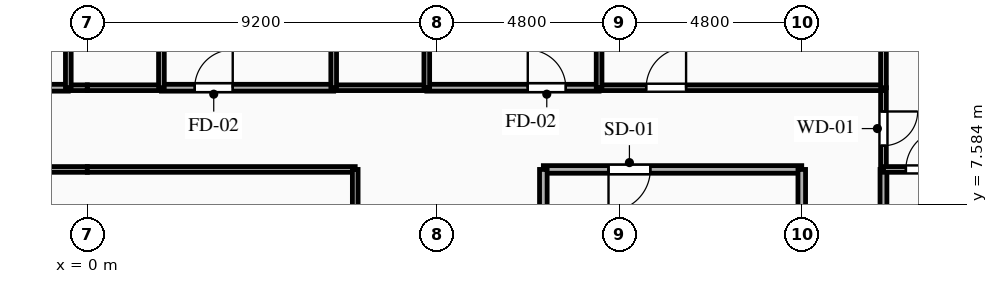
"""IFC4 building model, lengths in metres.
Left out: names, types, materials, properties, quantities, classifications, styles, units other than length and angle.
Written with IfcOpenShell. Run it as: python <this file> out.ifc"""

import sys

from ifc_helpers import new_model, si_unit, direction, frame, frame_2d, origin, place, context, subcontext, project, spatial, rectangle, extrude, element, fill, save


model = new_model("IFC4")
c1 = context("Model", 3, precision=1e-05, world=origin(), true_north=direction((0.0, 1.0)))
c2 = subcontext(c1, "Body", "Model", "MODEL_VIEW")
j1 = project(units=[si_unit("LENGTHUNIT", "METRE"), si_unit("PLANEANGLEUNIT", "RADIAN")], contexts=[c1])
p1 = place(None, origin())
s1 = spatial("IfcSite", under=j1, at=p1, CompositionType="ELEMENT")
p2 = place(p1, origin())
s2 = spatial("IfcBuilding", under=s1, at=p2, CompositionType="ELEMENT")
p3 = place(p2, frame((0.0, 0.0, 157.8)))
s3 = spatial("IfcBuildingStorey", under=s2, at=p3, CompositionType="ELEMENT", Elevation=157.8)
p4 = place(p3, frame((18.8, 8.5, 0.0), z_axis=(0.0, 0.0, 1.0), x_axis=(-1.0, 0.0, 0.0)))
e1 = element("IfcWall", 1, at=p4, inside=s3, PredefinedType="PARTITIONING", context=c2, shape_type="SweptSolid", body=[
    extrude(rectangle(XDim=6.8, YDim=0.2, at=frame_2d((3.4, 0.0))), origin(), (0.0, 0.0, 1.0), 3.04),
])
p5 = place(p4, frame((3.985, 0.0, 0.0)))
e2 = element("IfcOpeningElement", 2, at=p5, cuts=e1, PredefinedType="OPENING", context=c2, shape_type="SweptSolid", body=[
    extrude(rectangle(XDim=1.1, YDim=2.15, at=frame_2d((0.55, 1.075))), frame((0.0, 0.11, 0.0), z_axis=(0.0, -1.0, 0.0), x_axis=(1.0, 0.0, 0.0)), (0.0, 0.0, 1.0), 0.22),
])
p6 = place(p3, frame((18.8, 5.6, 0.0), z_axis=(0.0, 0.0, 1.0), x_axis=(0.0, 1.0, 0.0)))
e3 = element("IfcWall", 3, at=p6, inside=s3, PredefinedType="PARTITIONING", context=c2, shape_type="SweptSolid", body=[
    extrude(rectangle(XDim=2.9, YDim=0.2, at=frame_2d((1.45, 0.0))), origin(), (0.0, 0.0, 1.0), 2.525),
])
p7 = place(p3, frame((12.0, 8.5, 0.0), z_axis=(0.0, 0.0, 1.0), x_axis=(0.0, -1.0, 0.0)))
e4 = element("IfcWall", 4, at=p7, inside=s3, PredefinedType="PARTITIONING", context=c2, shape_type="SweptSolid", body=[
    extrude(rectangle(XDim=2.9, YDim=0.2, at=frame_2d((1.45, 0.0))), origin(), (0.0, 0.0, 1.0), 3.04),
])
p8 = place(p3, frame((-5.033, 10.65, 0.0), z_axis=(0.0, 0.0, 1.0), x_axis=(1.0, 0.0, 0.0)))
e5 = element("IfcWall", 5, at=p8, inside=s3, PredefinedType="PARTITIONING", context=c2, shape_type="SweptSolid", body=[
    extrude(rectangle(XDim=4.533, YDim=0.18, at=frame_2d((2.267, 0.0))), origin(), (0.0, 0.0, 1.0), 3.04),
])
p9 = place(p8, frame((2.656, 0.0, 0.0)))
e6 = element("IfcOpeningElement", 6, at=p9, cuts=e5, PredefinedType="OPENING", context=c2, shape_type="SweptSolid", body=[
    extrude(rectangle(XDim=1.0, YDim=2.15, at=frame_2d((0.5, 1.075))), frame((0.0, 0.1, 0.0), z_axis=(0.0, -1.0, 0.0), x_axis=(1.0, 0.0, 0.0)), (0.0, 0.0, 1.0), 0.2),
])
p10 = place(p3, frame((-0.5, 10.65, 0.0), z_axis=(0.0, 0.0, 1.0), x_axis=(1.0, 0.0, 0.0)))
e7 = element("IfcWall", 7, at=p10, inside=s3, PredefinedType="PLUMBINGWALL", context=c2, shape_type="SweptSolid", body=[
    extrude(rectangle(XDim=0.5, YDim=0.15, at=frame_2d((0.25, 0.0))), origin(), (0.0, 0.0, 1.0), 3.04),
])
p11 = place(p3, frame((0.0, 8.5, 0.0), z_axis=(0.0, 0.0, 1.0), x_axis=(-1.0, 0.0, 0.0)))
e8 = element("IfcWall", 8, at=p11, inside=s3, PredefinedType="PARTITIONING", context=c2, shape_type="SweptSolid", body=[
    extrude(rectangle(XDim=7.05, YDim=0.15, at=frame_2d((3.525, 0.0))), origin(), (0.0, 0.0, 1.0), 3.04),
])
p12 = place(p3, frame((20.95, 10.65, 0.0), z_axis=(0.0, 0.0, 1.0), x_axis=(0.0, -1.0, 0.0)))
e9 = element("IfcWall", 9, at=p12, inside=s3, PredefinedType="PARTITIONING", context=c2, shape_type="SweptSolid", body=[
    extrude(rectangle(XDim=2.15, YDim=0.15, at=frame_2d((1.075, 0.0))), origin(), (0.0, 0.0, 1.0), 3.04),
])
p13 = place(p12, frame((0.625, 0.0, 0.0)))
e10 = element("IfcOpeningElement", 10, at=p13, cuts=e9, PredefinedType="OPENING", context=c2, shape_type="SweptSolid", body=[
    extrude(rectangle(XDim=0.9, YDim=2.1, at=frame_2d((0.45, 1.05))), frame((0.0, 0.085, 0.0), z_axis=(0.0, -1.0, 0.0), x_axis=(1.0, 0.0, 0.0)), (0.0, 0.0, 1.0), 0.17),
])
p14 = place(p3, frame((1.95, 10.65, 0.0), z_axis=(0.0, 0.0, 1.0), x_axis=(1.0, 0.0, 0.0)))
e11 = element("IfcWall", 11, at=p14, inside=s3, PredefinedType="PARTITIONING", context=c2, shape_type="SweptSolid", body=[
    extrude(rectangle(XDim=4.533, YDim=0.18, at=frame_2d((2.267, 0.0))), origin(), (0.0, 0.0, 1.0), 3.04),
])
p15 = place(p14, frame((0.877, 0.0, 0.0)))
e12 = element("IfcOpeningElement", 12, at=p15, cuts=e11, PredefinedType="OPENING", context=c2, shape_type="SweptSolid", body=[
    extrude(rectangle(XDim=1.0, YDim=2.15, at=frame_2d((0.5, 1.075))), frame((0.0, 0.1, 0.0), z_axis=(0.0, -1.0, 0.0), x_axis=(1.0, 0.0, 0.0)), (0.0, 0.0, 1.0), 0.2),
])
p16 = place(p3, frame((0.0, 10.65, 0.0), z_axis=(0.0, 0.0, 1.0), x_axis=(1.0, 0.0, 0.0)))
e13 = element("IfcWall", 13, at=p16, inside=s3, PredefinedType="PLUMBINGWALL", context=c2, shape_type="SweptSolid", body=[
    extrude(rectangle(XDim=1.95, YDim=0.15, at=frame_2d((0.975, 0.0))), origin(), (0.0, 0.0, 1.0), 3.04),
])
p17 = place(p3, frame((8.933, 10.65, 0.0), z_axis=(0.0, 0.0, 1.0), x_axis=(1.0, 0.0, 0.0)))
e14 = element("IfcWall", 14, at=p17, inside=s3, PredefinedType="PARTITIONING", context=c2, shape_type="SweptSolid", body=[
    extrude(rectangle(XDim=4.534, YDim=0.18, at=frame_2d((2.267, 0.0))), origin(), (0.0, 0.0, 1.0), 3.04),
])
p18 = place(p17, frame((2.657, 0.0, 0.0)))
e15 = element("IfcOpeningElement", 15, at=p18, cuts=e14, PredefinedType="OPENING", context=c2, shape_type="SweptSolid", body=[
    extrude(rectangle(XDim=1.0, YDim=2.15, at=frame_2d((0.5, 1.075))), frame((0.0, 0.1, 0.0), z_axis=(0.0, -1.0, 0.0), x_axis=(1.0, 0.0, 0.0)), (0.0, 0.0, 1.0), 0.2),
])
p19 = place(p3, frame((6.483, 10.65, 0.0), z_axis=(0.0, 0.0, 1.0), x_axis=(1.0, 0.0, 0.0)))
e16 = element("IfcWall", 16, at=p19, inside=s3, PredefinedType="PLUMBINGWALL", context=c2, shape_type="SweptSolid", body=[
    extrude(rectangle(XDim=2.45, YDim=0.15, at=frame_2d((1.225, 0.0))), origin(), (0.0, 0.0, 1.0), 3.04),
])
p20 = place(p3, frame((13.467, 10.65, 0.0), z_axis=(0.0, 0.0, 1.0), x_axis=(1.0, 0.0, 0.0)))
e17 = element("IfcWall", 17, at=p20, inside=s3, PredefinedType="PARTITIONING", context=c2, shape_type="SweptSolid", body=[
    extrude(rectangle(XDim=7.483, YDim=0.15, at=frame_2d((3.741, 0.0))), origin(), (0.0, 0.0, 1.0), 3.04),
])
p21 = place(p20, frame((1.239, 0.0, 0.0)))
e18 = element("IfcOpeningElement", 18, at=p21, cuts=e17, PredefinedType="OPENING", context=c2, shape_type="SweptSolid", body=[
    extrude(rectangle(XDim=1.05, YDim=2.15, at=frame_2d((0.525, 1.075))), frame((0.0, 0.085, 0.0), z_axis=(0.0, -1.0, 0.0), x_axis=(1.0, 0.0, 0.0)), (0.0, 0.0, 1.0), 0.17),
])
p22 = place(p3, frame((7.05, 8.5, 0.0), z_axis=(0.0, 0.0, 1.0), x_axis=(-1.0, 0.0, 0.0)))
e19 = element("IfcWall", 19, at=p22, inside=s3, PredefinedType="PARTITIONING", context=c2, shape_type="SweptSolid", body=[
    extrude(rectangle(XDim=7.05, YDim=0.15, at=frame_2d((3.525, 0.0))), origin(), (0.0, 0.0, 1.0), 3.04),
])
p23 = place(p3, frame((20.95, 8.5, 0.0), z_axis=(0.0, 0.0, 1.0), x_axis=(0.0, -1.0, 0.0)))
e20 = element("IfcWall", 20, at=p23, inside=s3, PredefinedType="PARTITIONING", context=c2, shape_type="SweptSolid", body=[
    extrude(rectangle(XDim=14.1, YDim=0.18, at=frame_2d((7.05, 0.0))), origin(), (0.0, 0.0, 1.0), 3.04),
])
p24 = place(p23, frame((8.042, 0.0, 0.0)))
e21 = element("IfcOpeningElement", 21, at=p24, cuts=e20, PredefinedType="OPENING", context=c2, shape_type="SweptSolid", body=[
    extrude(rectangle(XDim=1.0, YDim=2.15, at=frame_2d((0.5, 1.075))), frame((0.0, 0.1, 0.0), z_axis=(0.0, -1.0, 0.0), x_axis=(1.0, 0.0, 0.0)), (0.0, 0.0, 1.0), 0.2),
])
p25 = place(p3, frame((7.05, -0.8, 0.0), z_axis=(0.0, 0.0, 1.0), x_axis=(0.0, 1.0, 0.0)))
e22 = element("IfcWall", 22, at=p25, inside=s3, PredefinedType="PARTITIONING", context=c2, shape_type="SweptSolid", body=[
    extrude(rectangle(XDim=9.3, YDim=0.15, at=frame_2d((4.65, 0.0))), origin(), (0.0, 0.0, 1.0), 3.04),
])
p26 = place(p3, frame((20.95, 8.5, 0.0), z_axis=(0.0, 0.0, 1.0), x_axis=(1.0, 0.0, 0.0)))
e23 = element("IfcWall", 23, at=p26, inside=s3, PredefinedType="PARTITIONING", context=c2, shape_type="SweptSolid", body=[
    extrude(rectangle(XDim=2.23, YDim=0.15, at=frame_2d((1.115, 0.0))), origin(), (0.0, 0.0, 1.0), 3.04),
])
p27 = place(p26, frame((0.59, 0.0, 0.0)))
e24 = element("IfcOpeningElement", 24, at=p27, cuts=e23, PredefinedType="OPENING", context=c2, shape_type="SweptSolid", body=[
    extrude(rectangle(XDim=1.05, YDim=2.15, at=frame_2d((0.525, 1.075))), frame((0.0, 0.085, 0.0), z_axis=(0.0, -1.0, 0.0), x_axis=(1.0, 0.0, 0.0)), (0.0, 0.0, 1.0), 0.17),
])
p28 = place(p3, frame((20.95, 10.65, 0.0), z_axis=(0.0, 0.0, 1.0), x_axis=(0.0, 1.0, 0.0)))
e25 = element("IfcWall", 25, at=p28, inside=s3, PredefinedType="PARTITIONING", context=c2, shape_type="SweptSolid", body=[
    extrude(rectangle(XDim=9.75, YDim=0.15, at=frame_2d((4.875, 0.0))), origin(), (0.0, 0.0, 1.0), 2.525),
])
for number, where, z_axis, x_axis in (
    (26, (-0.5, 12.8, 0.0), (0.0, 0.0, 1.0), (0.0, -1.0, 0.0)),
    (27, (1.95, 10.65, 0.0), (0.0, 0.0, 1.0), (0.0, 1.0, 0.0)),
    (28, (6.483, 12.8, 0.0), (0.0, 0.0, 1.0), (0.0, -1.0, 0.0)),
    (29, (8.933, 10.65, 0.0), (0.0, 0.0, 1.0), (0.0, 1.0, 0.0)),
):
    element("IfcWall", number, at=place(p3, frame(where, z_axis=z_axis, x_axis=x_axis)), inside=s3, PredefinedType="PLUMBINGWALL", context=c2, shape_type="SweptSolid", body=[
        extrude(rectangle(XDim=2.15, YDim=0.15, at=frame_2d((1.075, 0.0))), origin(), (0.0, 0.0, 1.0), 3.04),
    ])
p29 = place(p3, frame((13.467, 20.4, 0.0), z_axis=(0.0, 0.0, 1.0), x_axis=(0.0, -1.0, 0.0)))
e30 = element("IfcWall", 30, at=p29, inside=s3, PredefinedType="PARTITIONING", context=c2, shape_type="SweptSolid", body=[
    extrude(rectangle(XDim=9.75, YDim=0.15, at=frame_2d((4.875, 0.0))), origin(), (0.0, 0.0, 1.0), 3.04),
])
p30 = place(p5, origin())
e31 = element("IfcDoor", 31, at=p30, inside=s3, OperationType="SINGLE_SWING_RIGHT", PredefinedType="DOOR", context=c2, shape_type="SweptSolid", body=[
    extrude(rectangle(XDim=1.1, YDim=2.15, at=frame_2d((0.55, 1.075))), frame((0.0, 0.025, 0.0), z_axis=(0.0, -1.0, 0.0), x_axis=(1.0, 0.0, 0.0)), (0.0, 0.0, 1.0), 0.05),
])
fill(e2, e31)
p31 = place(p13, origin())
e32 = element("IfcDoor", 32, at=p31, inside=s3, OperationType="SINGLE_SWING_LEFT", PredefinedType="DOOR", context=c2, shape_type="SweptSolid", body=[
    extrude(rectangle(XDim=0.9, YDim=2.1, at=frame_2d((0.45, 1.05))), frame((0.0, 0.025, 0.0), z_axis=(0.0, -1.0, 0.0), x_axis=(1.0, 0.0, 0.0)), (0.0, 0.0, 1.0), 0.05),
])
fill(e10, e32)
p32 = place(p15, origin())
e33 = element("IfcDoor", 33, at=p32, inside=s3, OperationType="SINGLE_SWING_RIGHT", PredefinedType="DOOR", context=c2, shape_type="SweptSolid", body=[
    extrude(rectangle(XDim=1.0, YDim=2.15, at=frame_2d((0.5, 1.075))), frame((0.0, 0.025, 0.0), z_axis=(0.0, -1.0, 0.0), x_axis=(1.0, 0.0, 0.0)), (0.0, 0.0, 1.0), 0.05),
])
fill(e12, e33)
p33 = place(p18, origin())
e34 = element("IfcDoor", 34, at=p33, inside=s3, OperationType="SINGLE_SWING_LEFT", PredefinedType="DOOR", context=c2, shape_type="SweptSolid", body=[
    extrude(rectangle(XDim=1.0, YDim=2.15, at=frame_2d((0.5, 1.075))), frame((0.0, 0.025, 0.0), z_axis=(0.0, -1.0, 0.0), x_axis=(1.0, 0.0, 0.0)), (0.0, 0.0, 1.0), 0.05),
])
fill(e15, e34)
p34 = place(p21, origin())
e35 = element("IfcDoor", 35, at=p34, inside=s3, OperationType="SINGLE_SWING_RIGHT", PredefinedType="DOOR", context=c2, shape_type="SweptSolid", body=[
    extrude(rectangle(XDim=1.05, YDim=2.15, at=frame_2d((0.525, 1.075))), frame((0.0, 0.025, 0.0), z_axis=(0.0, -1.0, 0.0), x_axis=(1.0, 0.0, 0.0)), (0.0, 0.0, 1.0), 0.05),
])
fill(e18, e35)
p35 = place(p27, origin())
e36 = element("IfcDoor", 36, at=p35, inside=s3, OperationType="SINGLE_SWING_RIGHT", PredefinedType="DOOR", context=c2, shape_type="SweptSolid", body=[
    extrude(rectangle(XDim=1.05, YDim=2.15, at=frame_2d((0.525, 1.075))), frame((0.0, 0.025, 0.0), z_axis=(0.0, -1.0, 0.0), x_axis=(1.0, 0.0, 0.0)), (0.0, 0.0, 1.0), 0.05),
])
fill(e24, e36)
save(model, sys.argv[1])
